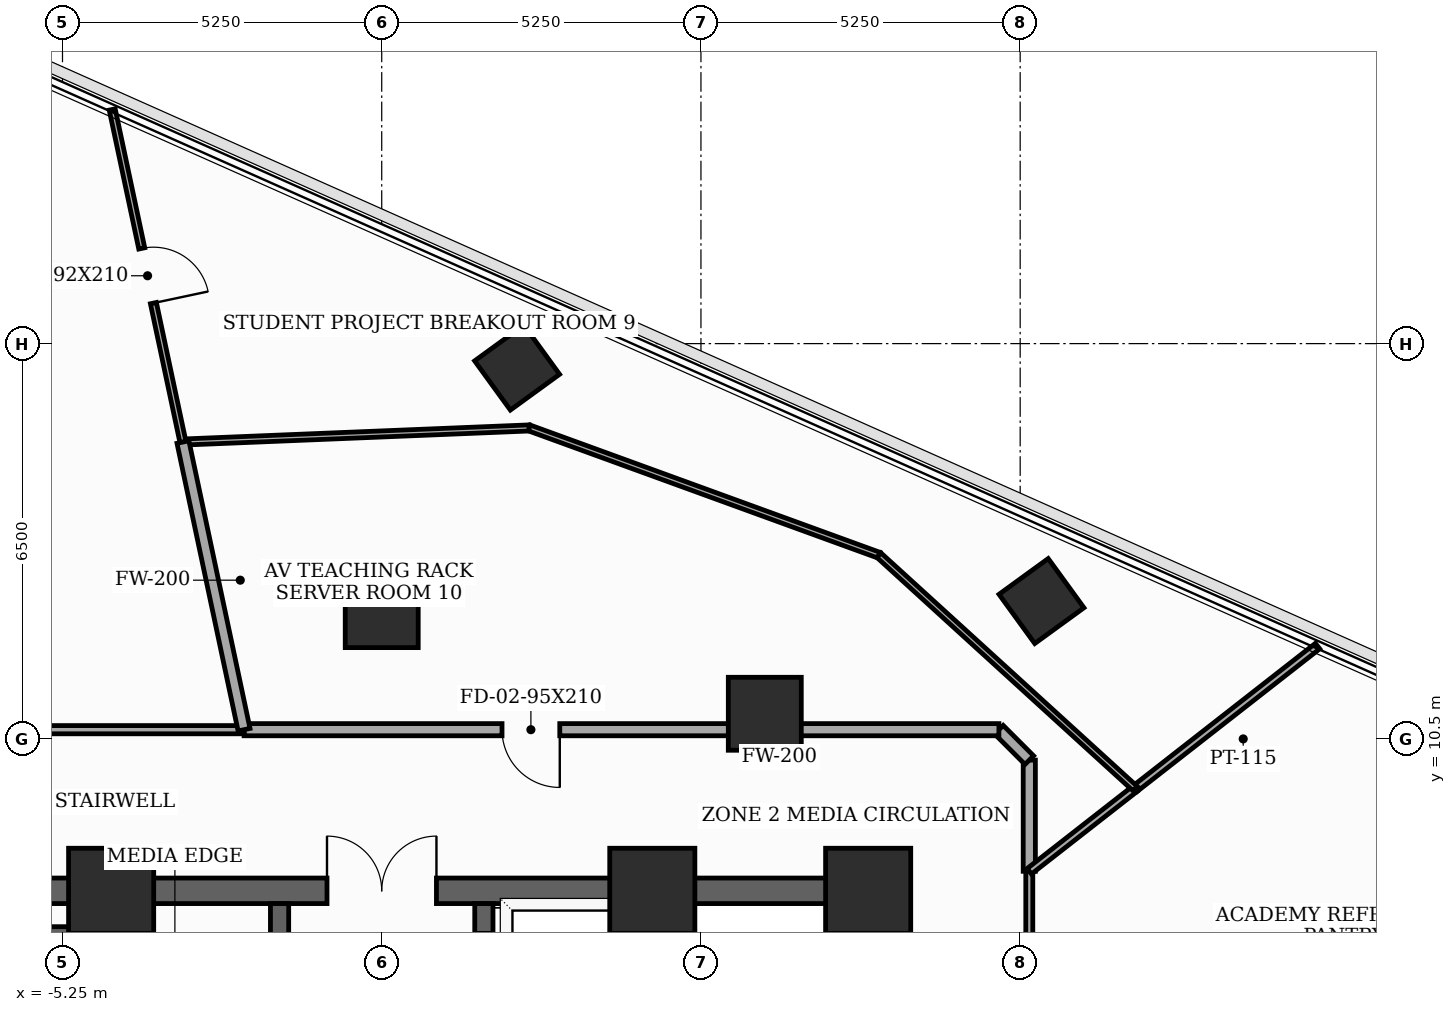
"""IFC4 building model, lengths in metres.
Left out: names, types, materials, properties, quantities, classifications, styles, units other than length and angle.
Written with IfcOpenShell. Run it as: python <this file> out.ifc"""

import sys

from ifc_helpers import new_model, si_unit, direction, frame, frame_2d, origin, origin_2d, place, context, subcontext, project, spatial, rectangle, extrude, element, fill, save


model = new_model("IFC4")
c1 = context("Model", 3, precision=1e-05, world=origin(), true_north=direction((0.0, 1.0)))
c2 = subcontext(c1, "Body", "Model", "MODEL_VIEW")
j1 = project(units=[si_unit("LENGTHUNIT", "METRE"), si_unit("PLANEANGLEUNIT", "RADIAN")], contexts=[c1])
p1 = place(None, origin())
s1 = spatial("IfcSite", under=j1, at=p1, CompositionType="ELEMENT")
p2 = place(p1, origin())
s2 = spatial("IfcBuilding", under=s1, at=p2, CompositionType="ELEMENT")
p3 = place(p2, frame((0.0, 0.0, 165.7)))
s3 = spatial("IfcBuildingStorey", under=s2, at=p3, CompositionType="ELEMENT", Elevation=165.7)
for number, where, z_axis, x_axis in (
    (1, (8.0, 8.0, 0.0), (0.0, 0.0, 1.0), (1.0, 0.0, 0.0)),
    (2, (4.45, 8.0, 0.0), (0.0, 0.0, 1.0), (1.0, 0.0, 0.0)),
    (3, (-4.45, 8.0, 0.0), (0.0, 0.0, 1.0), (1.0, 0.0, 0.0)),
):
    element("IfcColumn", number, at=place(p3, frame(where, z_axis=z_axis, x_axis=x_axis)), inside=s3, PredefinedType="COLUMN", context=c2, shape_type="SweptSolid", body=[
        extrude(rectangle(XDim=1.4, YDim=1.4, at=origin_2d()), origin(), (0.0, 0.0, 1.0), 3.7),
    ])
for number, where, z_axis, x_axis in (
    (4, (6.3, 10.912, 0.0), (0.0, 0.0, 1.0), (1.0, 0.0, 0.0)),
    (5, (0.0, 12.6, 0.0), (0.0, 0.0, 1.0), (1.0, 0.0, 0.0)),
):
    element("IfcColumn", number, at=place(p3, frame(where, z_axis=z_axis, x_axis=x_axis)), inside=s3, PredefinedType="COLUMN", context=c2, shape_type="SweptSolid", body=[
        extrude(rectangle(XDim=1.2, YDim=1.2, at=origin_2d()), origin(), (0.0, 0.0, 1.0), 3.7),
    ])
for number, where, z_axis, x_axis in (
    (6, (10.85, 12.766, 0.0), (0.0, 0.0, 1.0), (0.809, 0.588, 0.0)),
    (7, (2.227, 16.605, 0.0), (0.0, 0.0, 1.0), (0.809, 0.588, 0.0)),
):
    element("IfcColumn", number, at=place(p3, frame(where, z_axis=z_axis, x_axis=x_axis)), inside=s3, PredefinedType="COLUMN", context=c2, shape_type="SweptSolid", body=[
        extrude(rectangle(XDim=1.0, YDim=1.0, at=origin_2d()), origin(), (0.0, 0.0, 1.0), 3.7),
    ])
p4 = place(p3, frame((8.0, -8.0, 0.0), z_axis=(0.0, 0.0, 1.0), x_axis=(0.0, 1.0, 0.0)))
e8 = element("IfcWall", 8, at=p4, inside=s3, PredefinedType="SHEAR", context=c2, shape_type="SweptSolid", body=[
    extrude(rectangle(XDim=16.0, YDim=0.42, at=frame_2d((8.0, 0.0))), origin(), (0.0, 0.0, 1.0), 3.5),
])
p5 = place(p4, frame((9.6, 0.0, 0.0)))
e9 = element("IfcOpeningElement", 9, at=p5, cuts=e8, PredefinedType="OPENING", context=c2, shape_type="SweptSolid", body=[
    extrude(rectangle(XDim=1.05, YDim=2.15, at=frame_2d((0.525, 1.075))), frame((0.0, 0.22, 0.0), z_axis=(0.0, -1.0, 0.0), x_axis=(1.0, 0.0, 0.0)), (0.0, 0.0, 1.0), 0.44),
])
p6 = place(p4, frame((14.229, 0.0, 0.0)))
e10 = element("IfcOpeningElement", 10, at=p6, cuts=e8, PredefinedType="OPENING", context=c2, shape_type="SweptSolid", body=[
    extrude(rectangle(XDim=0.85, YDim=2.02, at=frame_2d((0.425, 1.01))), frame((0.0, 0.22, 0.0), z_axis=(0.0, -1.0, 0.0), x_axis=(1.0, 0.0, 0.0)), (0.0, 0.0, 1.0), 0.44),
])
p7 = place(p3, frame((-8.0, 8.0, 0.0), z_axis=(0.0, 0.0, 1.0), x_axis=(1.0, 0.0, 0.0)))
e11 = element("IfcWall", 11, at=p7, inside=s3, PredefinedType="SHEAR", context=c2, shape_type="SweptSolid", body=[
    extrude(rectangle(XDim=16.0, YDim=0.42, at=frame_2d((8.0, 0.0))), origin(), (0.0, 0.0, 1.0), 3.5),
])
p8 = place(p7, frame((7.1, 0.0, 0.0)))
e12 = element("IfcOpeningElement", 12, at=p8, cuts=e11, PredefinedType="OPENING", context=c2, shape_type="SweptSolid", body=[
    extrude(rectangle(XDim=1.8, YDim=2.15, at=frame_2d((0.9, 1.075))), frame((0.0, 0.22, 0.0), z_axis=(0.0, -1.0, 0.0), x_axis=(1.0, 0.0, 0.0)), (0.0, 0.0, 1.0), 0.44),
])
for number, where, z_axis, x_axis in (
    (13, (-4.45, -7.79, 0.0), (0.0, 0.0, 1.0), (0.0, 1.0, 0.0)),
    (14, (4.45, -7.79, 0.0), (0.0, 0.0, 1.0), (0.0, 1.0, 0.0)),
):
    element("IfcWall", number, at=place(p3, frame(where, z_axis=z_axis, x_axis=x_axis)), inside=s3, PredefinedType="SHEAR", context=c2, shape_type="SweptSolid", body=[
        extrude(rectangle(XDim=15.58, YDim=0.3, at=frame_2d((7.79, 0.0))), origin(), (0.0, 0.0, 1.0), 3.5),
    ])
p9 = place(p3, frame((-7.79, 7.26, 0.0), z_axis=(0.0, 0.0, 1.0), x_axis=(1.0, 0.0, 0.0)))
e15 = element("IfcWall", 15, at=p9, inside=s3, PredefinedType="SHEAR", context=c2, shape_type="SweptSolid", body=[
    extrude(rectangle(XDim=3.34, YDim=0.3, at=frame_2d((1.67, 0.0))), origin(), (0.0, 0.0, 1.0), 3.5),
])
p10 = place(p3, frame((-1.68, -4.85, 0.0), z_axis=(0.0, 0.0, 1.0), x_axis=(0.0, 1.0, 0.0)))
e16 = element("IfcWall", 16, at=p10, inside=s3, PredefinedType="SHEAR", context=c2, shape_type="SweptSolid", body=[
    extrude(rectangle(XDim=12.64, YDim=0.3, at=frame_2d((6.32, 0.0))), origin(), (0.0, 0.0, 1.0), 3.5),
])
p11 = place(p10, frame((1.65, 0.0, 0.0)))
e17 = element("IfcOpeningElement", 17, at=p11, cuts=e16, PredefinedType="OPENING", context=c2, shape_type="SweptSolid", body=[
    extrude(rectangle(XDim=0.95, YDim=2.1, at=frame_2d((0.475, 1.05))), frame((0.0, 0.16, 0.0), z_axis=(0.0, -1.0, 0.0), x_axis=(1.0, 0.0, 0.0)), (0.0, 0.0, 1.0), 0.32),
])
p12 = place(p10, frame((5.9, 0.0, 0.0)))
e18 = element("IfcOpeningElement", 18, at=p12, cuts=e16, PredefinedType="OPENING", context=c2, shape_type="SweptSolid", body=[
    extrude(rectangle(XDim=0.95, YDim=2.1, at=frame_2d((0.475, 1.05))), frame((0.0, 0.16, 0.0), z_axis=(0.0, -1.0, 0.0), x_axis=(1.0, 0.0, 0.0)), (0.0, 0.0, 1.0), 0.32),
])
p13 = place(p10, frame((10.1, 0.0, 0.0)))
e19 = element("IfcOpeningElement", 19, at=p13, cuts=e16, PredefinedType="OPENING", context=c2, shape_type="SweptSolid", body=[
    extrude(rectangle(XDim=0.95, YDim=2.1, at=frame_2d((0.475, 1.05))), frame((0.0, 0.16, 0.0), z_axis=(0.0, -1.0, 0.0), x_axis=(1.0, 0.0, 0.0)), (0.0, 0.0, 1.0), 0.32),
])
p14 = place(p3, frame((1.68, -4.85, 0.0), z_axis=(0.0, 0.0, 1.0), x_axis=(0.0, 1.0, 0.0)))
e20 = element("IfcWall", 20, at=p14, inside=s3, PredefinedType="SHEAR", context=c2, shape_type="SweptSolid", body=[
    extrude(rectangle(XDim=12.64, YDim=0.3, at=frame_2d((6.32, 0.0))), origin(), (0.0, 0.0, 1.0), 3.5),
])
p15 = place(p14, frame((0.55, 0.0, 0.0)))
e21 = element("IfcOpeningElement", 21, at=p15, cuts=e20, PredefinedType="OPENING", context=c2, shape_type="SweptSolid", body=[
    extrude(rectangle(XDim=1.1, YDim=2.1, at=frame_2d((0.55, 1.05))), frame((0.0, 0.16, 0.0), z_axis=(0.0, -1.0, 0.0), x_axis=(1.0, 0.0, 0.0)), (0.0, 0.0, 1.0), 0.32),
])
p16 = place(p14, frame((2.65, 0.0, 0.0)))
e22 = element("IfcOpeningElement", 22, at=p16, cuts=e20, PredefinedType="OPENING", context=c2, shape_type="SweptSolid", body=[
    extrude(rectangle(XDim=1.1, YDim=2.1, at=frame_2d((0.55, 1.05))), frame((0.0, 0.16, 0.0), z_axis=(0.0, -1.0, 0.0), x_axis=(1.0, 0.0, 0.0)), (0.0, 0.0, 1.0), 0.32),
])
p17 = place(p14, frame((4.75, 0.0, 0.0)))
e23 = element("IfcOpeningElement", 23, at=p17, cuts=e20, PredefinedType="OPENING", context=c2, shape_type="SweptSolid", body=[
    extrude(rectangle(XDim=1.1, YDim=2.1, at=frame_2d((0.55, 1.05))), frame((0.0, 0.16, 0.0), z_axis=(0.0, -1.0, 0.0), x_axis=(1.0, 0.0, 0.0)), (0.0, 0.0, 1.0), 0.32),
])
p18 = place(p14, frame((6.85, 0.0, 0.0)))
e24 = element("IfcOpeningElement", 24, at=p18, cuts=e20, PredefinedType="OPENING", context=c2, shape_type="SweptSolid", body=[
    extrude(rectangle(XDim=1.1, YDim=2.1, at=frame_2d((0.55, 1.05))), frame((0.0, 0.16, 0.0), z_axis=(0.0, -1.0, 0.0), x_axis=(1.0, 0.0, 0.0)), (0.0, 0.0, 1.0), 0.32),
])
p19 = place(p14, frame((8.95, 0.0, 0.0)))
e25 = element("IfcOpeningElement", 25, at=p19, cuts=e20, PredefinedType="OPENING", context=c2, shape_type="SweptSolid", body=[
    extrude(rectangle(XDim=1.1, YDim=2.1, at=frame_2d((0.55, 1.05))), frame((0.0, 0.16, 0.0), z_axis=(0.0, -1.0, 0.0), x_axis=(1.0, 0.0, 0.0)), (0.0, 0.0, 1.0), 0.32),
])
p20 = place(p14, frame((11.05, 0.0, 0.0)))
e26 = element("IfcOpeningElement", 26, at=p20, cuts=e20, PredefinedType="OPENING", context=c2, shape_type="SweptSolid", body=[
    extrude(rectangle(XDim=1.1, YDim=2.1, at=frame_2d((0.55, 1.05))), frame((0.0, 0.16, 0.0), z_axis=(0.0, -1.0, 0.0), x_axis=(1.0, 0.0, 0.0)), (0.0, 0.0, 1.0), 0.32),
])
p21 = place(p3, frame((10.65, 2.264, 0.0), z_axis=(0.0, 0.0, 1.0), x_axis=(0.0, 1.0, 0.0)))
e27 = element("IfcWall", 27, at=p21, inside=s3, PredefinedType="PARTITIONING", context=c2, shape_type="SweptSolid", body=[
    extrude(rectangle(XDim=6.057, YDim=0.115, at=frame_2d((3.029, 0.0))), origin(), (0.0, 0.0, 1.0), 2.885),
])
p22 = place(p21, frame((0.736, 0.0, 0.0)))
e28 = element("IfcOpeningElement", 28, at=p22, cuts=e27, PredefinedType="OPENING", context=c2, shape_type="SweptSolid", body=[
    extrude(rectangle(XDim=0.95, YDim=2.1, at=frame_2d((0.475, 1.05))), frame((0.0, 0.067, 0.0), z_axis=(0.0, -1.0, 0.0), x_axis=(1.0, 0.0, 0.0)), (0.0, 0.0, 1.0), 0.135),
])
p23 = place(p3, frame((10.65, 8.321, 0.0), z_axis=(0.0, 0.0, 1.0), x_axis=(0.0, 1.0, 0.0)))
e29 = element("IfcWall", 29, at=p23, inside=s3, PredefinedType="SOLIDWALL", context=c2, shape_type="SweptSolid", body=[
    extrude(rectangle(XDim=1.829, YDim=0.2, at=frame_2d((0.915, 0.0))), origin(), (0.0, 0.0, 1.0), 3.5),
])
p24 = place(p3, frame((10.65, 10.15, 0.0), z_axis=(0.0, 0.0, 1.0), x_axis=(-0.707106781187, 0.707106781187, 0.0)))
e30 = element("IfcWall", 30, at=p24, inside=s3, PredefinedType="SOLIDWALL", context=c2, shape_type="SweptSolid", body=[
    extrude(rectangle(XDim=0.707, YDim=0.2, at=frame_2d((0.354, 0.0))), origin(), (0.0, 0.0, 1.0), 3.5),
])
p25 = place(p3, frame((10.15, 10.65, 0.0), z_axis=(0.0, 0.0, 1.0), x_axis=(-1.0, 0.0, 0.0)))
e31 = element("IfcWall", 31, at=p25, inside=s3, PredefinedType="SOLIDWALL", context=c2, shape_type="SweptSolid", body=[
    extrude(rectangle(XDim=12.414, YDim=0.2, at=frame_2d((6.207, 0.0))), origin(), (0.0, 0.0, 1.0), 2.885),
])
p26 = place(p25, frame((7.222, 0.0, 0.0)))
e32 = element("IfcOpeningElement", 32, at=p26, cuts=e31, PredefinedType="OPENING", context=c2, shape_type="SweptSolid", body=[
    extrude(rectangle(XDim=0.95, YDim=2.1, at=frame_2d((0.475, 1.05))), frame((0.0, 0.11, 0.0), z_axis=(0.0, -1.0, 0.0), x_axis=(1.0, 0.0, 0.0)), (0.0, 0.0, 1.0), 0.22),
])
p27 = place(p3, frame((-2.264, 10.65, 0.0), z_axis=(0.0, 0.0, 1.0), x_axis=(-1.0, 0.0, 0.0)))
e33 = element("IfcWall", 33, at=p27, inside=s3, PredefinedType="PARTITIONING", context=c2, shape_type="SweptSolid", body=[
    extrude(rectangle(XDim=7.886, YDim=0.135, at=frame_2d((3.943, 0.0))), origin(), (0.0, 0.0, 1.0), 2.885),
])
p28 = place(p3, frame((15.391, 12.025, 0.0), z_axis=(0.0, 0.0, 1.0), x_axis=(-0.787968951689, -0.615714975597, 0.0)))
e34 = element("IfcWall", 34, at=p28, inside=s3, PredefinedType="PARTITIONING", context=c2, shape_type="SweptSolid", body=[
    extrude(rectangle(XDim=3.807, YDim=0.115, at=frame_2d((1.903, 0.0))), origin(), (0.0, 0.0, 1.0), 2.985),
])
p29 = place(p3, frame((12.391, 9.681, 0.0), z_axis=(0.0, 0.0, 1.0), x_axis=(-0.788124883644, -0.615515367624, 0.0)))
e35 = element("IfcWall", 35, at=p29, inside=s3, PredefinedType="PARTITIONING", context=c2, shape_type="SweptSolid", body=[
    extrude(rectangle(XDim=2.209, YDim=0.115, at=frame_2d((1.104, 0.0))), origin(), (0.0, 0.0, 1.0), 3.5),
])
p30 = place(p3, frame((-3.269, 15.381, 0.0), z_axis=(0.0, 0.0, 1.0), x_axis=(0.999171753478, 0.040691609114, 0.0)))
e36 = element("IfcWall", 36, at=p30, inside=s3, PredefinedType="MOVABLE", context=c2, shape_type="SweptSolid", body=[
    extrude(rectangle(XDim=5.7, YDim=0.1, at=frame_2d((2.85, 0.0))), origin(), (0.0, 0.0, 1.0), 2.885),
])
p31 = place(p3, frame((2.426, 15.613, 0.0), z_axis=(0.0, 0.0, 1.0), x_axis=(0.939701375228, -0.341996089736, 0.0)))
e37 = element("IfcWall", 37, at=p31, inside=s3, PredefinedType="MOVABLE", context=c2, shape_type="SweptSolid", body=[
    extrude(rectangle(XDim=6.12, YDim=0.1, at=frame_2d((3.06, 0.0))), origin(), (0.0, 0.0, 1.0), 3.5),
])
p32 = place(p3, frame((8.177, 13.52, 0.0), z_axis=(0.0, 0.0, 1.0), x_axis=(0.739232344885, -0.673450473514, 0.0)))
e38 = element("IfcWall", 38, at=p32, inside=s3, PredefinedType="MOVABLE", context=c2, shape_type="SweptSolid", body=[
    extrude(rectangle(XDim=5.701, YDim=0.1, at=frame_2d((2.85, 0.0))), origin(), (0.0, 0.0, 1.0), 2.885),
])
p33 = place(p3, frame((-4.432, 20.851, 0.0), z_axis=(0.0, 0.0, 1.0), x_axis=(0.208032106743, -0.978121997792, 0.0)))
e39 = element("IfcWall", 39, at=p33, inside=s3, PredefinedType="MOVABLE", context=c2, shape_type="SweptSolid", body=[
    extrude(rectangle(XDim=5.592, YDim=0.1, at=frame_2d((2.796, 0.0))), origin(), (0.0, 0.0, 1.0), 2.985),
])
p34 = place(p33, frame((2.336, 0.0, 0.0)))
e40 = element("IfcOpeningElement", 40, at=p34, cuts=e39, PredefinedType="OPENING", context=c2, shape_type="SweptSolid", body=[
    extrude(rectangle(XDim=0.92, YDim=2.1, at=frame_2d((0.46, 1.05))), frame((0.0, 0.06, 0.0), z_axis=(0.0, -1.0, 0.0), x_axis=(1.0, 0.0, 0.0)), (0.0, 0.0, 1.0), 0.12),
])
p35 = place(p3, frame((-3.269, 15.381, 0.0), z_axis=(0.0, 0.0, 1.0), x_axis=(0.207808649559, -0.978169497157, 0.0)))
e41 = element("IfcWall", 41, at=p35, inside=s3, PredefinedType="SOLIDWALL", context=c2, shape_type="SweptSolid", body=[
    extrude(rectangle(XDim=4.837, YDim=0.2, at=frame_2d((2.418, 0.0))), origin(), (0.0, 0.0, 1.0), 2.885),
])
p36 = place(p8, origin())
e42 = element("IfcDoor", 42, at=p36, inside=s3, OperationType="DOUBLE_DOOR_SINGLE_SWING", PredefinedType="DOOR", context=c2, shape_type="SweptSolid", body=[
    extrude(rectangle(XDim=1.8, YDim=2.15, at=frame_2d((0.9, 1.075))), frame((0.0, 0.025, 0.0), z_axis=(0.0, -1.0, 0.0), x_axis=(1.0, 0.0, 0.0)), (0.0, 0.0, 1.0), 0.05),
])
fill(e12, e42)
p37 = place(p26, origin())
e43 = element("IfcDoor", 43, at=p37, inside=s3, OperationType="SINGLE_SWING_LEFT", PredefinedType="DOOR", context=c2, shape_type="SweptSolid", body=[
    extrude(rectangle(XDim=0.95, YDim=2.1, at=frame_2d((0.475, 1.05))), frame((0.0, 0.025, 0.0), z_axis=(0.0, -1.0, 0.0), x_axis=(1.0, 0.0, 0.0)), (0.0, 0.0, 1.0), 0.05),
])
fill(e32, e43)
p38 = place(p34, origin())
e44 = element("IfcDoor", 44, at=p38, inside=s3, OperationType="SINGLE_SWING_RIGHT", PredefinedType="DOOR", context=c2, shape_type="SweptSolid", body=[
    extrude(rectangle(XDim=0.92, YDim=2.1, at=frame_2d((0.46, 1.05))), frame((0.0, 0.025, 0.0), z_axis=(0.0, -1.0, 0.0), x_axis=(1.0, 0.0, 0.0)), (0.0, 0.0, 1.0), 0.05),
])
fill(e40, e44)
save(model, sys.argv[1])
